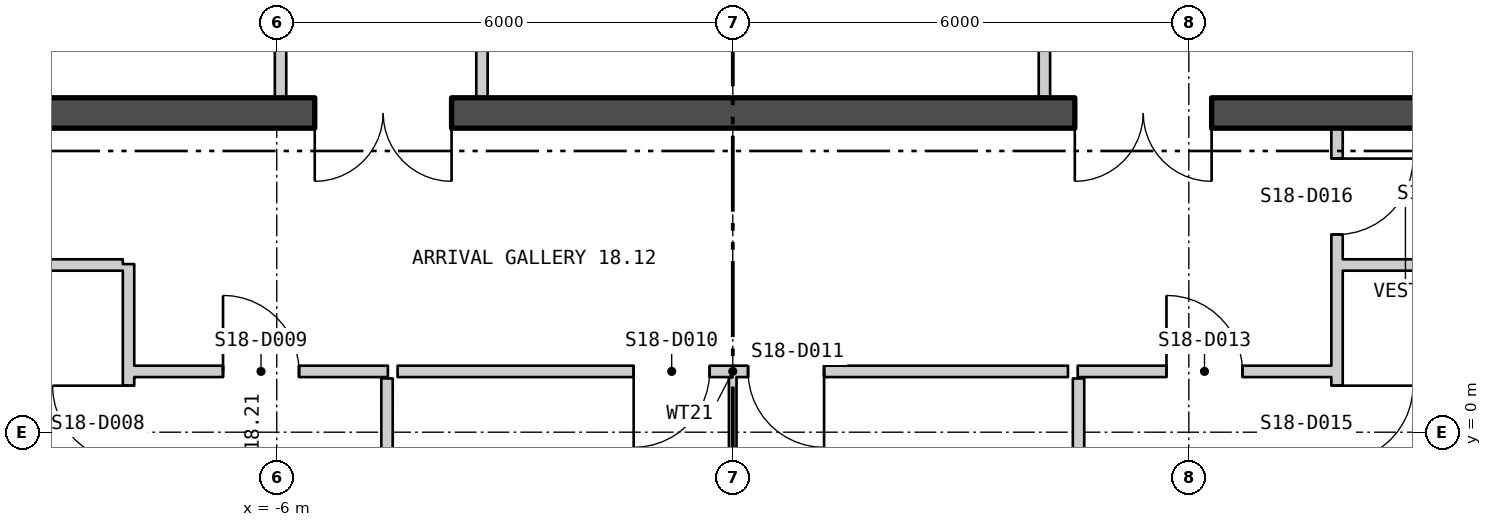
"""IFC4 building model, lengths in metres.
Left out: names, types, materials, properties, quantities, classifications, styles, units other than length and angle.
Written with IfcOpenShell. Run it as: python <this file> out.ifc"""

import sys

from ifc_helpers import new_model, si_unit, direction, frame, frame_2d, origin, place, context, subcontext, project, spatial, polyline, rectangle, outline, extrude, element, fill, save


model = new_model("IFC4")
c1 = context("Model", 3, precision=1e-05, world=origin(), true_north=direction((0.0, 1.0)))
c2 = subcontext(c1, "Body", "Model", "MODEL_VIEW")
j1 = project(units=[si_unit("LENGTHUNIT", "METRE"), si_unit("PLANEANGLEUNIT", "RADIAN")], contexts=[c1])
p1 = place(None, origin())
s1 = spatial("IfcSite", under=j1, at=p1, CompositionType="ELEMENT")
p2 = place(p1, origin())
s2 = spatial("IfcBuilding", under=s1, at=p2, CompositionType="ELEMENT")
p3 = place(p2, frame((0.0, 0.0, 245.4)))
s3 = spatial("IfcBuildingStorey", under=s2, at=p3, CompositionType="ELEMENT", Elevation=245.4)
p4 = place(p3, frame((-25.85, 14.822, -0.18), z_axis=(0.0, 0.0, 1.0), x_axis=(0.500000335318, -0.866025210188, 0.0)))
e1 = element("IfcWall", 1, at=p4, inside=s3, PredefinedType="SOLIDWALL", context=c2, shape_type="SweptSolid", body=[
    extrude(outline(polyline([(-0.13, -0.225), (45.88, -0.225), (45.62, 0.225), (0.13, 0.225), (-0.13, -0.225)])), origin(), (0.0, 0.0, 1.0), 3.68),
])
p5 = place(p4, frame((1.425, 0.0, 1.08)))
e2 = element("IfcOpeningElement", 2, at=p5, cuts=e1, PredefinedType="OPENING", context=c2, shape_type="SweptSolid", body=[
    extrude(rectangle(XDim=2.4, YDim=2.0, at=frame_2d((1.2, 1.0))), frame((0.0, 0.235, 0.0), z_axis=(0.0, -1.0, 0.0), x_axis=(1.0, 0.0, 0.0)), (0.0, 0.0, 1.0), 0.47),
])
p6 = place(p4, frame((10.403, 0.0, 1.08)))
e3 = element("IfcOpeningElement", 3, at=p6, cuts=e1, PredefinedType="OPENING", context=c2, shape_type="SweptSolid", body=[
    extrude(rectangle(XDim=2.4, YDim=2.0, at=frame_2d((1.2, 1.0))), frame((0.0, 0.235, 0.0), z_axis=(0.0, -1.0, 0.0), x_axis=(1.0, 0.0, 0.0)), (0.0, 0.0, 1.0), 0.47),
])
p7 = place(p4, frame((14.912, 0.0, 1.08)))
e4 = element("IfcOpeningElement", 4, at=p7, cuts=e1, PredefinedType="OPENING", context=c2, shape_type="SweptSolid", body=[
    extrude(rectangle(XDim=2.4, YDim=2.0, at=frame_2d((1.2, 1.0))), frame((0.0, 0.235, 0.0), z_axis=(0.0, -1.0, 0.0), x_axis=(1.0, 0.0, 0.0)), (0.0, 0.0, 1.0), 0.47),
])
p8 = place(p4, frame((19.421, 0.0, 1.08)))
e5 = element("IfcOpeningElement", 5, at=p8, cuts=e1, PredefinedType="OPENING", context=c2, shape_type="SweptSolid", body=[
    extrude(rectangle(XDim=2.4, YDim=2.0, at=frame_2d((1.2, 1.0))), frame((0.0, 0.235, 0.0), z_axis=(0.0, -1.0, 0.0), x_axis=(1.0, 0.0, 0.0)), (0.0, 0.0, 1.0), 0.47),
])
p9 = place(p4, frame((23.929, 0.0, 1.08)))
e6 = element("IfcOpeningElement", 6, at=p9, cuts=e1, PredefinedType="OPENING", context=c2, shape_type="SweptSolid", body=[
    extrude(rectangle(XDim=2.4, YDim=2.0, at=frame_2d((1.2, 1.0))), frame((0.0, 0.235, 0.0), z_axis=(0.0, -1.0, 0.0), x_axis=(1.0, 0.0, 0.0)), (0.0, 0.0, 1.0), 0.47),
])
p10 = place(p4, frame((28.438, 0.0, 1.08)))
e7 = element("IfcOpeningElement", 7, at=p10, cuts=e1, PredefinedType="OPENING", context=c2, shape_type="SweptSolid", body=[
    extrude(rectangle(XDim=2.4, YDim=2.0, at=frame_2d((1.2, 1.0))), frame((0.0, 0.235, 0.0), z_axis=(0.0, -1.0, 0.0), x_axis=(1.0, 0.0, 0.0)), (0.0, 0.0, 1.0), 0.47),
])
p11 = place(p4, frame((32.947, 0.0, 1.08)))
e8 = element("IfcOpeningElement", 8, at=p11, cuts=e1, PredefinedType="OPENING", context=c2, shape_type="SweptSolid", body=[
    extrude(rectangle(XDim=2.4, YDim=2.0, at=frame_2d((1.2, 1.0))), frame((0.0, 0.235, 0.0), z_axis=(0.0, -1.0, 0.0), x_axis=(1.0, 0.0, 0.0)), (0.0, 0.0, 1.0), 0.47),
])
p12 = place(p4, frame((37.455, 0.0, 1.08)))
e9 = element("IfcOpeningElement", 9, at=p12, cuts=e1, PredefinedType="OPENING", context=c2, shape_type="SweptSolid", body=[
    extrude(rectangle(XDim=2.4, YDim=2.0, at=frame_2d((1.2, 1.0))), frame((0.0, 0.235, 0.0), z_axis=(0.0, -1.0, 0.0), x_axis=(1.0, 0.0, 0.0)), (0.0, 0.0, 1.0), 0.47),
])
p13 = place(p4, frame((41.925, 0.0, 1.08)))
e10 = element("IfcOpeningElement", 10, at=p13, cuts=e1, PredefinedType="OPENING", context=c2, shape_type="SweptSolid", body=[
    extrude(rectangle(XDim=2.4, YDim=2.0, at=frame_2d((1.2, 1.0))), frame((0.0, 0.235, 0.0), z_axis=(0.0, -1.0, 0.0), x_axis=(1.0, 0.0, 0.0)), (0.0, 0.0, 1.0), 0.47),
])
p14 = place(p3, frame((2.975, -24.799, -0.18), z_axis=(0.0, 0.0, 1.0), x_axis=(0.500000335318, 0.866025210188, 0.0)))
e11 = element("IfcWall", 11, at=p14, inside=s3, PredefinedType="SOLIDWALL", context=c2, shape_type="SweptSolid", body=[
    extrude(outline(polyline([(-0.13, -0.225), (45.88, -0.225), (45.62, 0.225), (0.13, 0.225), (-0.13, -0.225)])), origin(), (0.0, 0.0, 1.0), 3.68),
])
p15 = place(p14, frame((1.425, 0.0, 1.08)))
e12 = element("IfcOpeningElement", 12, at=p15, cuts=e11, PredefinedType="OPENING", context=c2, shape_type="SweptSolid", body=[
    extrude(rectangle(XDim=2.4, YDim=2.0, at=frame_2d((1.2, 1.0))), frame((0.0, 0.235, 0.0), z_axis=(0.0, -1.0, 0.0), x_axis=(1.0, 0.0, 0.0)), (0.0, 0.0, 1.0), 0.47),
])
p16 = place(p14, frame((5.895, 0.0, 1.08)))
e13 = element("IfcOpeningElement", 13, at=p16, cuts=e11, PredefinedType="OPENING", context=c2, shape_type="SweptSolid", body=[
    extrude(rectangle(XDim=2.4, YDim=2.0, at=frame_2d((1.2, 1.0))), frame((0.0, 0.235, 0.0), z_axis=(0.0, -1.0, 0.0), x_axis=(1.0, 0.0, 0.0)), (0.0, 0.0, 1.0), 0.47),
])
p17 = place(p14, frame((10.403, 0.0, 1.08)))
e14 = element("IfcOpeningElement", 14, at=p17, cuts=e11, PredefinedType="OPENING", context=c2, shape_type="SweptSolid", body=[
    extrude(rectangle(XDim=2.4, YDim=2.0, at=frame_2d((1.2, 1.0))), frame((0.0, 0.235, 0.0), z_axis=(0.0, -1.0, 0.0), x_axis=(1.0, 0.0, 0.0)), (0.0, 0.0, 1.0), 0.47),
])
p18 = place(p14, frame((14.912, 0.0, 1.08)))
e15 = element("IfcOpeningElement", 15, at=p18, cuts=e11, PredefinedType="OPENING", context=c2, shape_type="SweptSolid", body=[
    extrude(rectangle(XDim=2.4, YDim=2.0, at=frame_2d((1.2, 1.0))), frame((0.0, 0.235, 0.0), z_axis=(0.0, -1.0, 0.0), x_axis=(1.0, 0.0, 0.0)), (0.0, 0.0, 1.0), 0.47),
])
p19 = place(p14, frame((19.421, 0.0, 1.08)))
e16 = element("IfcOpeningElement", 16, at=p19, cuts=e11, PredefinedType="OPENING", context=c2, shape_type="SweptSolid", body=[
    extrude(rectangle(XDim=2.4, YDim=2.0, at=frame_2d((1.2, 1.0))), frame((0.0, 0.235, 0.0), z_axis=(0.0, -1.0, 0.0), x_axis=(1.0, 0.0, 0.0)), (0.0, 0.0, 1.0), 0.47),
])
p20 = place(p14, frame((23.929, 0.0, 1.08)))
e17 = element("IfcOpeningElement", 17, at=p20, cuts=e11, PredefinedType="OPENING", context=c2, shape_type="SweptSolid", body=[
    extrude(rectangle(XDim=2.4, YDim=2.0, at=frame_2d((1.2, 1.0))), frame((0.0, 0.235, 0.0), z_axis=(0.0, -1.0, 0.0), x_axis=(1.0, 0.0, 0.0)), (0.0, 0.0, 1.0), 0.47),
])
p21 = place(p14, frame((28.438, 0.0, 1.08)))
e18 = element("IfcOpeningElement", 18, at=p21, cuts=e11, PredefinedType="OPENING", context=c2, shape_type="SweptSolid", body=[
    extrude(rectangle(XDim=2.4, YDim=2.0, at=frame_2d((1.2, 1.0))), frame((0.0, 0.235, 0.0), z_axis=(0.0, -1.0, 0.0), x_axis=(1.0, 0.0, 0.0)), (0.0, 0.0, 1.0), 0.47),
])
p22 = place(p14, frame((32.947, 0.0, 1.08)))
e19 = element("IfcOpeningElement", 19, at=p22, cuts=e11, PredefinedType="OPENING", context=c2, shape_type="SweptSolid", body=[
    extrude(rectangle(XDim=2.4, YDim=2.0, at=frame_2d((1.2, 1.0))), frame((0.0, 0.235, 0.0), z_axis=(0.0, -1.0, 0.0), x_axis=(1.0, 0.0, 0.0)), (0.0, 0.0, 1.0), 0.47),
])
p23 = place(p14, frame((37.455, 0.0, 1.08)))
e20 = element("IfcOpeningElement", 20, at=p23, cuts=e11, PredefinedType="OPENING", context=c2, shape_type="SweptSolid", body=[
    extrude(rectangle(XDim=2.4, YDim=2.0, at=frame_2d((1.2, 1.0))), frame((0.0, 0.235, 0.0), z_axis=(0.0, -1.0, 0.0), x_axis=(1.0, 0.0, 0.0)), (0.0, 0.0, 1.0), 0.47),
])
p24 = place(p14, frame((41.925, 0.0, 1.08)))
e21 = element("IfcOpeningElement", 21, at=p24, cuts=e11, PredefinedType="OPENING", context=c2, shape_type="SweptSolid", body=[
    extrude(rectangle(XDim=2.4, YDim=2.0, at=frame_2d((1.2, 1.0))), frame((0.0, 0.235, 0.0), z_axis=(0.0, -1.0, 0.0), x_axis=(1.0, 0.0, 0.0)), (0.0, 0.0, 1.0), 0.47),
])
p25 = place(p3, frame((-14.5, 4.2, 0.0), z_axis=(0.0, 0.0, 1.0), x_axis=(1.0, 0.0, 0.0)))
e22 = element("IfcWall", 22, at=p25, inside=s3, PredefinedType="SHEAR", context=c2, shape_type="SweptSolid", body=[
    extrude(rectangle(XDim=29.0, YDim=0.4, at=frame_2d((14.5, 0.0))), origin(), (0.0, 0.0, 1.0), 3.7),
])
p26 = place(p25, frame((9.0, 0.0, 0.0)))
e23 = element("IfcOpeningElement", 23, at=p26, cuts=e22, PredefinedType="OPENING", context=c2, shape_type="SweptSolid", body=[
    extrude(rectangle(XDim=1.8, YDim=2.4, at=frame_2d((0.9, 1.2))), frame((0.0, 0.21, 0.0), z_axis=(0.0, -1.0, 0.0), x_axis=(1.0, 0.0, 0.0)), (0.0, 0.0, 1.0), 0.42),
])
p27 = place(p25, frame((19.0, 0.0, 0.0)))
e24 = element("IfcOpeningElement", 24, at=p27, cuts=e22, PredefinedType="OPENING", context=c2, shape_type="SweptSolid", body=[
    extrude(rectangle(XDim=1.8, YDim=2.4, at=frame_2d((0.9, 1.2))), frame((0.0, 0.21, 0.0), z_axis=(0.0, -1.0, 0.0), x_axis=(1.0, 0.0, 0.0)), (0.0, 0.0, 1.0), 0.42),
])
for number, where, z_axis, x_axis in (
    (25, (-5.95, 4.4, 0.0), (0.0, 0.0, 1.0), (0.0, 1.0, 0.0)),
    (26, (-3.3, 4.4, 0.0), (0.0, 0.0, 1.0), (0.0, 1.0, 0.0)),
    (27, (4.1, 4.4, 0.0), (0.0, 0.0, 1.0), (0.0, 1.0, 0.0)),
):
    element("IfcWall", number, at=place(p3, frame(where, z_axis=z_axis, x_axis=x_axis)), inside=s3, PredefinedType="PARTITIONING", context=c2, shape_type="SweptSolid", body=[
        extrude(rectangle(XDim=1.895, YDim=0.15, at=frame_2d((0.948, 0.0))), origin(), (0.0, 0.0, 1.0), 3.7),
    ])
p28 = place(p3, frame((-16.225, 2.2, 0.0), z_axis=(0.0, 0.0, 1.0), x_axis=(1.0, 0.0, 0.0)))
e28 = element("IfcWall", 28, at=p28, inside=s3, PredefinedType="PARTITIONING", context=c2, shape_type="SweptSolid", body=[
    extrude(rectangle(XDim=8.2, YDim=0.15, at=frame_2d((4.1, 0.0))), origin(), (0.0, 0.0, 1.0), 3.7),
])
p29 = place(p3, frame((-7.95, -13.675, 0.0), z_axis=(0.0, 0.0, 1.0), x_axis=(0.0, 1.0, 0.0)))
e29 = element("IfcWall", 29, at=p29, inside=s3, PredefinedType="PARTITIONING", context=c2, shape_type="SweptSolid", body=[
    extrude(rectangle(XDim=15.887, YDim=0.15, at=frame_2d((7.944, 0.0))), origin(), (0.0, 0.0, 1.0), 3.7),
])
p30 = place(p29, frame((2.642, 0.0, 0.0)))
e30 = element("IfcOpeningElement", 30, at=p30, cuts=e29, PredefinedType="OPENING", context=c2, shape_type="SweptSolid", body=[
    extrude(rectangle(XDim=1.8, YDim=2.1, at=frame_2d((0.9, 1.05))), frame((0.0, 0.085, 0.0), z_axis=(0.0, -1.0, 0.0), x_axis=(1.0, 0.0, 0.0)), (0.0, 0.0, 1.0), 0.17),
])
p31 = place(p29, frame((7.411, 0.0, 0.0)))
e31 = element("IfcOpeningElement", 31, at=p31, cuts=e29, PredefinedType="OPENING", context=c2, shape_type="SweptSolid", body=[
    extrude(rectangle(XDim=1.0, YDim=2.1, at=frame_2d((0.5, 1.05))), frame((0.0, 0.085, 0.0), z_axis=(0.0, -1.0, 0.0), x_axis=(1.0, 0.0, 0.0)), (0.0, 0.0, 1.0), 0.17),
])
p32 = place(p29, frame((13.287, 0.0, 0.0)))
e32 = element("IfcOpeningElement", 32, at=p32, cuts=e29, PredefinedType="OPENING", context=c2, shape_type="SweptSolid", body=[
    extrude(rectangle(XDim=1.0, YDim=2.1, at=frame_2d((0.5, 1.05))), frame((0.0, 0.085, 0.0), z_axis=(0.0, -1.0, 0.0), x_axis=(1.0, 0.0, 0.0)), (0.0, 0.0, 1.0), 0.17),
])
p33 = place(p3, frame((-7.875, 0.8, 0.0), z_axis=(0.0, 0.0, 1.0), x_axis=(1.0, 0.0, 0.0)))
e33 = element("IfcWall", 33, at=p33, inside=s3, PredefinedType="PARTITIONING", context=c2, shape_type="SweptSolid", body=[
    extrude(rectangle(XDim=3.337, YDim=0.15, at=frame_2d((1.669, 0.0))), origin(), (0.0, 0.0, 1.0), 3.7),
])
p34 = place(p33, frame((1.168, 0.0, 0.0)))
e34 = element("IfcOpeningElement", 34, at=p34, cuts=e33, PredefinedType="OPENING", context=c2, shape_type="SweptSolid", body=[
    extrude(rectangle(XDim=1.0, YDim=2.1, at=frame_2d((0.5, 1.05))), frame((0.0, 0.085, 0.0), z_axis=(0.0, -1.0, 0.0), x_axis=(1.0, 0.0, 0.0)), (0.0, 0.0, 1.0), 0.17),
])
p35 = place(p3, frame((-4.55, -3.48, 0.0), z_axis=(0.0, 0.0, 1.0), x_axis=(0.000238834481, 0.999999971479, 0.0)))
e35 = element("IfcWall", 35, at=p35, inside=s3, PredefinedType="PARTITIONING", context=c2, shape_type="SweptSolid", body=[
    extrude(rectangle(XDim=4.187, YDim=0.15, at=frame_2d((2.094, 0.0))), origin(), (0.0, 0.0, 1.0), 3.7),
])
p36 = place(p3, frame((-4.41, 0.8, 0.0), z_axis=(0.0, 0.0, 1.0), x_axis=(1.0, 0.0, 0.0)))
e36 = element("IfcWall", 36, at=p36, inside=s3, PredefinedType="PARTITIONING", context=c2, shape_type="SweptSolid", body=[
    extrude(rectangle(XDim=8.82, YDim=0.15, at=frame_2d((4.41, 0.0))), origin(), (0.0, 0.0, 1.0), 3.7),
])
p37 = place(p36, frame((3.106, 0.0, 0.0)))
e37 = element("IfcOpeningElement", 37, at=p37, cuts=e36, PredefinedType="OPENING", context=c2, shape_type="SweptSolid", body=[
    extrude(rectangle(XDim=1.0, YDim=2.1, at=frame_2d((0.5, 1.05))), frame((0.0, 0.085, 0.0), z_axis=(0.0, -1.0, 0.0), x_axis=(1.0, 0.0, 0.0)), (0.0, 0.0, 1.0), 0.17),
])
p38 = place(p36, frame((4.611, 0.0, 0.0)))
e38 = element("IfcOpeningElement", 38, at=p38, cuts=e36, PredefinedType="OPENING", context=c2, shape_type="SweptSolid", body=[
    extrude(rectangle(XDim=1.0, YDim=2.1, at=frame_2d((0.5, 1.05))), frame((0.0, 0.085, 0.0), z_axis=(0.0, -1.0, 0.0), x_axis=(1.0, 0.0, 0.0)), (0.0, 0.0, 1.0), 0.17),
])
p39 = place(p3, frame((-0.001, 0.725, 0.0), z_axis=(0.0, 0.0, 1.0), x_axis=(0.000235294111, -0.999999972318, 0.0)))
e39 = element("IfcWall", 39, at=p39, inside=s3, PredefinedType="PARTITIONING", context=c2, shape_type="SweptSolid", body=[
    extrude(rectangle(XDim=3.825, YDim=0.1, at=frame_2d((1.913, 0.0))), origin(), (0.0, 0.0, 1.0), 3.2),
])
p40 = place(p3, frame((4.538, 0.8, 0.0), z_axis=(0.0, 0.0, 1.0), x_axis=(1.0, 0.0, 0.0)))
e40 = element("IfcWall", 40, at=p40, inside=s3, PredefinedType="PARTITIONING", context=c2, shape_type="SweptSolid", body=[
    extrude(rectangle(XDim=3.337, YDim=0.15, at=frame_2d((1.669, 0.0))), origin(), (0.0, 0.0, 1.0), 3.7),
])
p41 = place(p40, frame((1.168, 0.0, 0.0)))
e41 = element("IfcOpeningElement", 41, at=p41, cuts=e40, PredefinedType="OPENING", context=c2, shape_type="SweptSolid", body=[
    extrude(rectangle(XDim=1.0, YDim=2.1, at=frame_2d((0.5, 1.05))), frame((0.0, 0.085, 0.0), z_axis=(0.0, -1.0, 0.0), x_axis=(1.0, 0.0, 0.0)), (0.0, 0.0, 1.0), 0.17),
])
p42 = place(p3, frame((4.549, -3.48, 0.0), z_axis=(0.0, 0.0, 1.0), x_axis=(0.0, 1.0, 0.0)))
e42 = element("IfcWall", 42, at=p42, inside=s3, PredefinedType="PARTITIONING", context=c2, shape_type="SweptSolid", body=[
    extrude(rectangle(XDim=4.187, YDim=0.15, at=frame_2d((2.094, 0.0))), origin(), (0.0, 0.0, 1.0), 3.7),
])
p43 = place(p3, frame((7.95, -13.675, 0.0), z_axis=(0.0, 0.0, 1.0), x_axis=(0.0, 1.0, 0.0)))
e43 = element("IfcWall", 43, at=p43, inside=s3, PredefinedType="PARTITIONING", context=c2, shape_type="SweptSolid", body=[
    extrude(rectangle(XDim=17.675, YDim=0.15, at=frame_2d((8.838, 0.0))), origin(), (0.0, 0.0, 1.0), 3.7),
])
p44 = place(p43, frame((4.109, 0.0, 0.0)))
e44 = element("IfcOpeningElement", 44, at=p44, cuts=e43, PredefinedType="OPENING", context=c2, shape_type="SweptSolid", body=[
    extrude(rectangle(XDim=1.0, YDim=2.1, at=frame_2d((0.5, 1.05))), frame((0.0, 0.085, 0.0), z_axis=(0.0, -1.0, 0.0), x_axis=(1.0, 0.0, 0.0)), (0.0, 0.0, 1.0), 0.17),
])
p45 = place(p43, frame((13.287, 0.0, 0.0)))
e45 = element("IfcOpeningElement", 45, at=p45, cuts=e43, PredefinedType="OPENING", context=c2, shape_type="SweptSolid", body=[
    extrude(rectangle(XDim=1.0, YDim=2.1, at=frame_2d((0.5, 1.05))), frame((0.0, 0.085, 0.0), z_axis=(0.0, -1.0, 0.0), x_axis=(1.0, 0.0, 0.0)), (0.0, 0.0, 1.0), 0.17),
])
p46 = place(p43, frame((16.275, 0.0, 0.0)))
e46 = element("IfcOpeningElement", 46, at=p46, cuts=e43, PredefinedType="OPENING", context=c2, shape_type="SweptSolid", body=[
    extrude(rectangle(XDim=1.0, YDim=2.1, at=frame_2d((0.5, 1.05))), frame((0.0, 0.085, 0.0), z_axis=(0.0, -1.0, 0.0), x_axis=(1.0, 0.0, 0.0)), (0.0, 0.0, 1.0), 0.17),
])
p47 = place(p3, frame((8.025, 2.2, 0.0), z_axis=(0.0, 0.0, 1.0), x_axis=(1.0, 0.0, 0.0)))
e47 = element("IfcWall", 47, at=p47, inside=s3, PredefinedType="PARTITIONING", context=c2, shape_type="SweptSolid", body=[
    extrude(rectangle(XDim=8.2, YDim=0.15, at=frame_2d((4.1, 0.0))), origin(), (0.0, 0.0, 1.0), 3.7),
])
p48 = place(p26, origin())
e48 = element("IfcDoor", 48, at=p48, inside=s3, OperationType="DOUBLE_DOOR_SINGLE_SWING", PredefinedType="DOOR", context=c2, shape_type="SweptSolid", body=[
    extrude(rectangle(XDim=1.8, YDim=2.4, at=frame_2d((0.9, 1.2))), frame((0.0, 0.025, 0.0), z_axis=(0.0, -1.0, 0.0), x_axis=(1.0, 0.0, 0.0)), (0.0, 0.0, 1.0), 0.05),
])
fill(e23, e48)
p49 = place(p27, origin())
e49 = element("IfcDoor", 49, at=p49, inside=s3, OperationType="DOUBLE_DOOR_SINGLE_SWING", PredefinedType="DOOR", context=c2, shape_type="SweptSolid", body=[
    extrude(rectangle(XDim=1.8, YDim=2.4, at=frame_2d((0.9, 1.2))), frame((0.0, 0.025, 0.0), z_axis=(0.0, -1.0, 0.0), x_axis=(1.0, 0.0, 0.0)), (0.0, 0.0, 1.0), 0.05),
])
fill(e24, e49)
p50 = place(p32, origin())
e50 = element("IfcDoor", 50, at=p50, inside=s3, OperationType="SINGLE_SWING_LEFT", PredefinedType="DOOR", context=c2, shape_type="SweptSolid", body=[
    extrude(rectangle(XDim=1.0, YDim=2.1, at=frame_2d((0.5, 1.05))), frame((0.0, 0.025, 0.0), z_axis=(0.0, -1.0, 0.0), x_axis=(1.0, 0.0, 0.0)), (0.0, 0.0, 1.0), 0.05),
])
fill(e32, e50)
p51 = place(p34, origin())
e51 = element("IfcDoor", 51, at=p51, inside=s3, OperationType="SINGLE_SWING_RIGHT", PredefinedType="DOOR", context=c2, shape_type="SweptSolid", body=[
    extrude(rectangle(XDim=1.0, YDim=2.1, at=frame_2d((0.5, 1.05))), frame((0.0, 0.025, 0.0), z_axis=(0.0, -1.0, 0.0), x_axis=(1.0, 0.0, 0.0)), (0.0, 0.0, 1.0), 0.05),
])
fill(e34, e51)
p52 = place(p37, origin())
e52 = element("IfcDoor", 52, at=p52, inside=s3, OperationType="SINGLE_SWING_LEFT", PredefinedType="DOOR", context=c2, shape_type="SweptSolid", body=[
    extrude(rectangle(XDim=1.0, YDim=2.1, at=frame_2d((0.5, 1.05))), frame((0.0, 0.025, 0.0), z_axis=(0.0, -1.0, 0.0), x_axis=(1.0, 0.0, 0.0)), (0.0, 0.0, 1.0), 0.05),
])
fill(e37, e52)
p53 = place(p38, origin())
e53 = element("IfcDoor", 53, at=p53, inside=s3, OperationType="SINGLE_SWING_RIGHT", PredefinedType="DOOR", context=c2, shape_type="SweptSolid", body=[
    extrude(rectangle(XDim=1.0, YDim=2.1, at=frame_2d((0.5, 1.05))), frame((0.0, 0.025, 0.0), z_axis=(0.0, -1.0, 0.0), x_axis=(1.0, 0.0, 0.0)), (0.0, 0.0, 1.0), 0.05),
])
fill(e38, e53)
p54 = place(p41, origin())
e54 = element("IfcDoor", 54, at=p54, inside=s3, OperationType="SINGLE_SWING_RIGHT", PredefinedType="DOOR", context=c2, shape_type="SweptSolid", body=[
    extrude(rectangle(XDim=1.0, YDim=2.1, at=frame_2d((0.5, 1.05))), frame((0.0, 0.025, 0.0), z_axis=(0.0, -1.0, 0.0), x_axis=(1.0, 0.0, 0.0)), (0.0, 0.0, 1.0), 0.05),
])
fill(e41, e54)
p55 = place(p45, origin())
e55 = element("IfcDoor", 55, at=p55, inside=s3, OperationType="SINGLE_SWING_RIGHT", PredefinedType="DOOR", context=c2, shape_type="SweptSolid", body=[
    extrude(rectangle(XDim=1.0, YDim=2.1, at=frame_2d((0.5, 1.05))), frame((0.0, 0.025, 0.0), z_axis=(0.0, -1.0, 0.0), x_axis=(1.0, 0.0, 0.0)), (0.0, 0.0, 1.0), 0.05),
])
fill(e45, e55)
p56 = place(p46, origin())
e56 = element("IfcDoor", 56, at=p56, inside=s3, OperationType="SINGLE_SWING_RIGHT", PredefinedType="DOOR", context=c2, shape_type="SweptSolid", body=[
    extrude(rectangle(XDim=1.0, YDim=2.1, at=frame_2d((0.5, 1.05))), frame((0.0, 0.025, 0.0), z_axis=(0.0, -1.0, 0.0), x_axis=(1.0, 0.0, 0.0)), (0.0, 0.0, 1.0), 0.05),
])
fill(e46, e56)
save(model, sys.argv[1])
